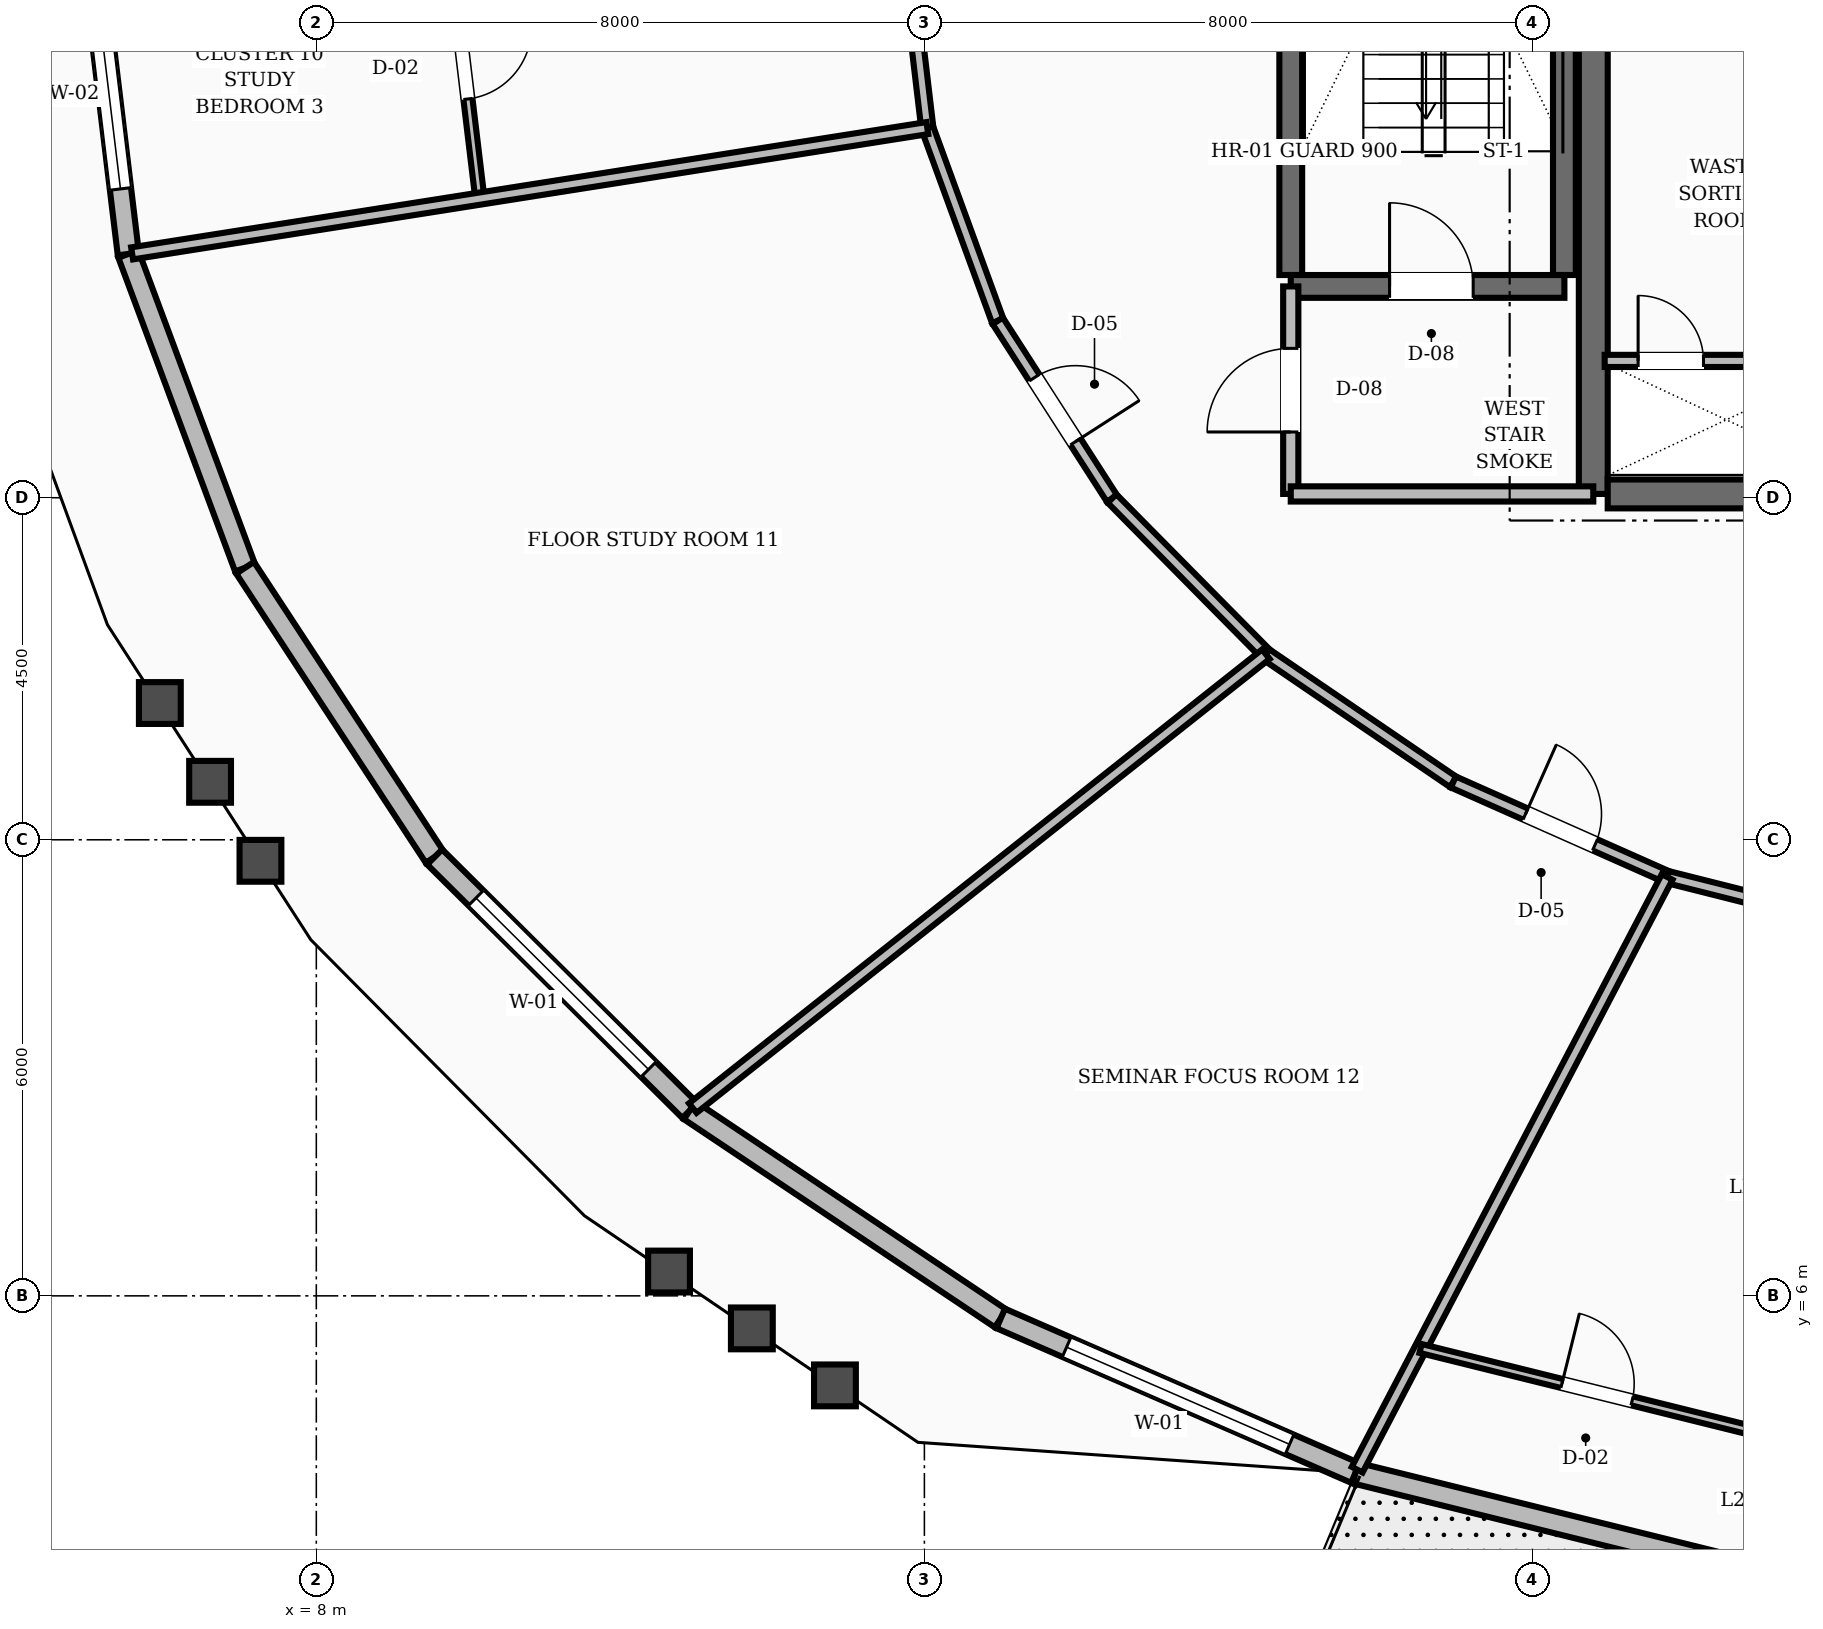
"""IFC4 building model, lengths in metres.
Left out: names, types, materials, properties, quantities, classifications, styles, units other than length and angle.
Written with IfcOpenShell. Run it as: python <this file> out.ifc"""

import sys

from ifc_helpers import new_model, si_unit, direction, frame, frame_2d, origin, place, context, subcontext, project, spatial, rectangle, extrude, element, fill, save


model = new_model("IFC4")
c1 = context("Model", 3, precision=1e-05, world=origin(), true_north=direction((0.0, 1.0)))
c2 = subcontext(c1, "Body", "Model", "MODEL_VIEW")
j1 = project(units=[si_unit("LENGTHUNIT", "METRE"), si_unit("PLANEANGLEUNIT", "RADIAN")], contexts=[c1])
p1 = place(None, origin())
s1 = spatial("IfcSite", under=j1, at=p1, CompositionType="ELEMENT")
p2 = place(p1, origin())
s2 = spatial("IfcBuilding", under=s1, at=p2, CompositionType="ELEMENT")
p3 = place(p2, frame((0.0, 0.0, 88.0)))
s3 = spatial("IfcBuildingStorey", under=s2, at=p3, CompositionType="ELEMENT", Elevation=88.0)
p4 = place(p3, frame((24.8, 16.55, 0.0), z_axis=(0.0, 0.0, 1.0), x_axis=(0.0, 1.0, 0.0)))
e1 = element("IfcWall", 1, at=p4, inside=s3, PredefinedType="SHEAR", context=c2, shape_type="SweptSolid", body=[
    extrude(rectangle(XDim=6.3, YDim=0.38, at=frame_2d((3.15, 0.0))), origin(), (0.0, 0.0, 1.0), 3.6),
])
p5 = place(p3, frame((24.99, 16.55, 0.0), z_axis=(0.0, 0.0, 1.0), x_axis=(1.0, 0.0, 0.0)))
e2 = element("IfcWall", 2, at=p5, inside=s3, PredefinedType="SHEAR", context=c2, shape_type="SweptSolid", body=[
    extrude(rectangle(XDim=3.21, YDim=0.38, at=frame_2d((1.605, 0.0))), origin(), (0.0, 0.0, 1.0), 3.6),
])
for number, where, z_axis, x_axis in (
    (3, (20.82, 19.43, 0.0), (0.0, 0.0, 1.0), (0.0, 1.0, 0.0)),
    (4, (24.42, 19.43, 0.0), (0.0, 0.0, 1.0), (0.0, 1.0, 0.0)),
):
    element("IfcWall", number, at=place(p3, frame(where, z_axis=z_axis, x_axis=x_axis)), inside=s3, PredefinedType="SHEAR", context=c2, shape_type="SweptSolid", body=[
        extrude(rectangle(XDim=8.74, YDim=0.3, at=frame_2d((4.37, 0.0))), origin(), (0.0, 0.0, 1.0), 3.6),
    ])
p6 = place(p3, frame((20.82, 19.28, 0.0), z_axis=(0.0, 0.0, 1.0), x_axis=(1.0, 0.0, 0.0)))
e5 = element("IfcWall", 5, at=p6, inside=s3, PredefinedType="SHEAR", context=c2, shape_type="SweptSolid", body=[
    extrude(rectangle(XDim=3.6, YDim=0.3, at=frame_2d((1.8, 0.0))), origin(), (0.0, 0.0, 1.0), 3.6),
])
p7 = place(p6, frame((1.3, 0.0, 0.0)))
e6 = element("IfcOpeningElement", 6, at=p7, cuts=e5, PredefinedType="OPENING", context=c2, shape_type="SweptSolid", body=[
    extrude(rectangle(XDim=1.1, YDim=2.1, at=frame_2d((0.55, 1.05))), frame((0.0, 0.16, 0.0), z_axis=(0.0, -1.0, 0.0), x_axis=(1.0, 0.0, 0.0)), (0.0, 0.0, 1.0), 0.32),
])
p8 = place(p3, frame((5.008, 24.0, 0.0), z_axis=(0.0, 0.0, 1.0), x_axis=(0.11991322244, -0.992784376934, 0.0)))
e7 = element("IfcWall", 7, at=p8, inside=s3, PredefinedType="STANDARD", context=c2, shape_type="SweptSolid", body=[
    extrude(rectangle(XDim=4.324, YDim=0.28, at=frame_2d((2.162, 0.0))), origin(), (0.0, 0.0, 1.0), 2.71),
])
p9 = place(p8, frame((0.862, 0.0, 0.8)))
e8 = element("IfcOpeningElement", 8, at=p9, cuts=e7, PredefinedType="OPENING", context=c2, shape_type="SweptSolid", body=[
    extrude(rectangle(XDim=2.6, YDim=1.65, at=frame_2d((1.3, 0.825))), frame((0.0, 0.15, 0.0), z_axis=(0.0, -1.0, 0.0), x_axis=(1.0, 0.0, 0.0)), (0.0, 0.0, 1.0), 0.3),
])
p10 = place(p3, frame((5.527, 19.707, 0.0), z_axis=(0.0, 0.0, 1.0), x_axis=(0.348747298865, -0.937216795376, 0.0)))
e9 = element("IfcWall", 9, at=p10, inside=s3, PredefinedType="STANDARD", context=c2, shape_type="SweptSolid", body=[
    extrude(rectangle(XDim=4.405, YDim=0.28, at=frame_2d((2.202, 0.0))), origin(), (0.0, 0.0, 1.0), 2.71),
])
p11 = place(p3, frame((7.063, 15.579, 0.0), z_axis=(0.0, 0.0, 1.0), x_axis=(0.548243756992, -0.836318589366, 0.0)))
e10 = element("IfcWall", 10, at=p11, inside=s3, PredefinedType="STANDARD", context=c2, shape_type="SweptSolid", body=[
    extrude(rectangle(XDim=4.549, YDim=0.28, at=frame_2d((2.275, 0.0))), origin(), (0.0, 0.0, 1.0), 2.71),
])
p12 = place(p3, frame((9.557, 11.774, 0.0), z_axis=(0.0, 0.0, 1.0), x_axis=(0.709450520297, -0.704755247763, 0.0)))
e11 = element("IfcWall", 11, at=p12, inside=s3, PredefinedType="STANDARD", context=c2, shape_type="SweptSolid", body=[
    extrude(rectangle(XDim=4.732, YDim=0.28, at=frame_2d((2.366, 0.0))), origin(), (0.0, 0.0, 1.0), 2.71),
])
p13 = place(p12, frame((0.766, 0.0, 0.8)))
e12 = element("IfcOpeningElement", 12, at=p13, cuts=e11, PredefinedType="OPENING", context=c2, shape_type="SweptSolid", body=[
    extrude(rectangle(XDim=3.2, YDim=1.65, at=frame_2d((1.6, 0.825))), frame((0.0, 0.15, 0.0), z_axis=(0.0, -1.0, 0.0), x_axis=(1.0, 0.0, 0.0)), (0.0, 0.0, 1.0), 0.3),
])
p14 = place(p3, frame((12.914, 8.439, 0.0), z_axis=(0.0, 0.0, 1.0), x_axis=(0.831102692713, -0.556118974829, 0.0)))
e13 = element("IfcWall", 13, at=p14, inside=s3, PredefinedType="STANDARD", context=c2, shape_type="SweptSolid", body=[
    extrude(rectangle(XDim=4.921, YDim=0.28, at=frame_2d((2.461, 0.0))), origin(), (0.0, 0.0, 1.0), 2.71),
])
p15 = place(p3, frame((17.004, 5.702, 0.0), z_axis=(0.0, 0.0, 1.0), x_axis=(0.916744158445, -0.399474840205, 0.0)))
e14 = element("IfcWall", 14, at=p15, inside=s3, PredefinedType="STANDARD", context=c2, shape_type="SweptSolid", body=[
    extrude(rectangle(XDim=5.09, YDim=0.28, at=frame_2d((2.545, 0.0))), origin(), (0.0, 0.0, 1.0), 2.71),
])
p16 = place(p15, frame((0.945, 0.0, 0.8)))
e15 = element("IfcOpeningElement", 15, at=p16, cuts=e14, PredefinedType="OPENING", context=c2, shape_type="SweptSolid", body=[
    extrude(rectangle(XDim=3.2, YDim=1.65, at=frame_2d((1.6, 0.825))), frame((0.0, 0.15, 0.0), z_axis=(0.0, -1.0, 0.0), x_axis=(1.0, 0.0, 0.0)), (0.0, 0.0, 1.0), 0.3),
])
p17 = place(p3, frame((21.671, 3.669, 0.0), z_axis=(0.0, 0.0, 1.0), x_axis=(0.970745192344, -0.240111997913, 0.0)))
e16 = element("IfcWall", 16, at=p17, inside=s3, PredefinedType="STANDARD", context=c2, shape_type="SweptSolid", body=[
    extrude(rectangle(XDim=5.216, YDim=0.28, at=frame_2d((2.608, 0.0))), origin(), (0.0, 0.0, 1.0), 2.71),
])
p18 = place(p3, frame((20.82, 16.55, 0.0), z_axis=(0.0, 0.0, 1.0), x_axis=(0.0, 1.0, 0.0)))
e17 = element("IfcWall", 17, at=p18, inside=s3, PredefinedType="SOLIDWALL", context=c2, shape_type="SweptSolid", body=[
    extrude(rectangle(XDim=2.73, YDim=0.2, at=frame_2d((1.365, 0.0))), origin(), (0.0, 0.0, 1.0), 2.71),
])
p19 = place(p18, frame((0.815, 0.0, 0.0)))
e18 = element("IfcOpeningElement", 18, at=p19, cuts=e17, PredefinedType="OPENING", context=c2, shape_type="SweptSolid", body=[
    extrude(rectangle(XDim=1.1, YDim=2.1, at=frame_2d((0.55, 1.05))), frame((0.0, 0.11, 0.0), z_axis=(0.0, -1.0, 0.0), x_axis=(1.0, 0.0, 0.0)), (0.0, 0.0, 1.0), 0.22),
])
p20 = place(p3, frame((20.82, 16.55, 0.0), z_axis=(0.0, 0.0, 1.0), x_axis=(1.0, 0.0, 0.0)))
e19 = element("IfcWall", 19, at=p20, inside=s3, PredefinedType="SOLIDWALL", context=c2, shape_type="SweptSolid", body=[
    extrude(rectangle(XDim=3.98, YDim=0.2, at=frame_2d((1.99, 0.0))), origin(), (0.0, 0.0, 1.0), 2.71),
])
p21 = place(p3, frame((24.95, 18.3, 0.0), z_axis=(0.0, 0.0, 1.0), x_axis=(1.0, 0.0, 0.0)))
e20 = element("IfcWall", 20, at=p21, inside=s3, PredefinedType="SOLIDWALL", context=c2, shape_type="SweptSolid", body=[
    extrude(rectangle(XDim=3.2, YDim=0.16, at=frame_2d((1.6, 0.0))), origin(), (0.0, 0.0, 1.0), 2.71),
])
p22 = place(p21, frame((0.44, 0.0, 0.0)))
e21 = element("IfcOpeningElement", 21, at=p22, cuts=e20, PredefinedType="OPENING", context=c2, shape_type="SweptSolid", body=[
    extrude(rectangle(XDim=0.86, YDim=2.05, at=frame_2d((0.43, 1.025))), frame((0.0, 0.09, 0.0), z_axis=(0.0, -1.0, 0.0), x_axis=(1.0, 0.0, 0.0)), (0.0, 0.0, 1.0), 0.18),
])
p23 = place(p3, frame((15.726, 24.0, 0.0), z_axis=(0.0, 0.0, 1.0), x_axis=(0.117763961213, -0.99304161516, 0.0)))
e22 = element("IfcWall", 22, at=p23, inside=s3, PredefinedType="SOLIDWALL", context=c2, shape_type="SweptSolid", body=[
    extrude(rectangle(XDim=2.656, YDim=0.16, at=frame_2d((1.328, 0.0))), origin(), (0.0, 0.0, 1.0), 2.71),
])
p24 = place(p3, frame((16.039, 21.363, 0.0), z_axis=(0.0, 0.0, 1.0), x_axis=(0.343013437329, -0.939330496583, 0.0)))
e23 = element("IfcWall", 23, at=p24, inside=s3, PredefinedType="SOLIDWALL", context=c2, shape_type="SweptSolid", body=[
    extrude(rectangle(XDim=2.7, YDim=0.16, at=frame_2d((1.35, 0.0))), origin(), (0.0, 0.0, 1.0), 2.71),
])
p25 = place(p3, frame((16.965, 18.827, 0.0), z_axis=(0.0, 0.0, 1.0), x_axis=(0.541126045017, -0.840941498206, 0.0)))
e24 = element("IfcWall", 24, at=p25, inside=s3, PredefinedType="SOLIDWALL", context=c2, shape_type="SweptSolid", body=[
    extrude(rectangle(XDim=2.779, YDim=0.16, at=frame_2d((1.39, 0.0))), origin(), (0.0, 0.0, 1.0), 2.71),
])
p26 = place(p25, frame((0.89, 0.0, 0.0)))
e25 = element("IfcOpeningElement", 25, at=p26, cuts=e24, PredefinedType="OPENING", context=c2, shape_type="SweptSolid", body=[
    extrude(rectangle(XDim=1.0, YDim=2.1, at=frame_2d((0.5, 1.05))), frame((0.0, 0.09, 0.0), z_axis=(0.0, -1.0, 0.0), x_axis=(1.0, 0.0, 0.0)), (0.0, 0.0, 1.0), 0.18),
])
p27 = place(p3, frame((18.469, 16.49, 0.0), z_axis=(0.0, 0.0, 1.0), x_axis=(0.702811997, -0.711375636969, 0.0)))
e26 = element("IfcWall", 26, at=p27, inside=s3, PredefinedType="SOLIDWALL", context=c2, shape_type="SweptSolid", body=[
    extrude(rectangle(XDim=2.879, YDim=0.16, at=frame_2d((1.44, 0.0))), origin(), (0.0, 0.0, 1.0), 2.71),
])
p28 = place(p3, frame((20.492, 14.441, 0.0), z_axis=(0.0, 0.0, 1.0), x_axis=(0.826293096206, -0.56324037423, 0.0)))
e27 = element("IfcWall", 27, at=p28, inside=s3, PredefinedType="SOLIDWALL", context=c2, shape_type="SweptSolid", body=[
    extrude(rectangle(XDim=2.985, YDim=0.16, at=frame_2d((1.492, 0.0))), origin(), (0.0, 0.0, 1.0), 2.71),
])
p29 = place(p3, frame((22.959, 12.76, 0.0), z_axis=(0.0, 0.0, 1.0), x_axis=(0.913952123493, -0.405822024984, 0.0)))
e28 = element("IfcWall", 28, at=p29, inside=s3, PredefinedType="SOLIDWALL", context=c2, shape_type="SweptSolid", body=[
    extrude(rectangle(XDim=3.078, YDim=0.16, at=frame_2d((1.539, 0.0))), origin(), (0.0, 0.0, 1.0), 2.71),
])
p30 = place(p29, frame((1.039, 0.0, 0.0)))
e29 = element("IfcOpeningElement", 29, at=p30, cuts=e28, PredefinedType="OPENING", context=c2, shape_type="SweptSolid", body=[
    extrude(rectangle(XDim=1.0, YDim=2.1, at=frame_2d((0.5, 1.05))), frame((0.0, 0.09, 0.0), z_axis=(0.0, -1.0, 0.0), x_axis=(1.0, 0.0, 0.0)), (0.0, 0.0, 1.0), 0.18),
])
p31 = place(p3, frame((25.772, 11.511, 0.0), z_axis=(0.0, 0.0, 1.0), x_axis=(0.969689238064, -0.244341526521, 0.0)))
e30 = element("IfcWall", 30, at=p31, inside=s3, PredefinedType="SOLIDWALL", context=c2, shape_type="SweptSolid", body=[
    extrude(rectangle(XDim=3.148, YDim=0.16, at=frame_2d((1.574, 0.0))), origin(), (0.0, 0.0, 1.0), 2.71),
])
p32 = place(p3, frame((9.724, 24.0, 0.0), z_axis=(0.0, 0.0, 1.0), x_axis=(0.119204211049, -0.992869757858, 0.0)))
e31 = element("IfcWall", 31, at=p32, inside=s3, PredefinedType="PARTITIONING", context=c2, shape_type="SweptSolid", body=[
    extrude(rectangle(XDim=3.59, YDim=0.12, at=frame_2d((1.795, 0.0))), origin(), (0.0, 0.0, 1.0), 2.71),
])
p33 = place(p32, frame((1.32, 0.0, 0.0)))
e32 = element("IfcOpeningElement", 32, at=p33, cuts=e31, PredefinedType="OPENING", context=c2, shape_type="SweptSolid", body=[
    extrude(rectangle(XDim=0.95, YDim=2.1, at=frame_2d((0.475, 1.05))), frame((0.0, 0.07, 0.0), z_axis=(0.0, -1.0, 0.0), x_axis=(1.0, 0.0, 0.0)), (0.0, 0.0, 1.0), 0.14),
])
p34 = place(p3, frame((16.039, 21.363, 0.0), z_axis=(0.0, 0.0, 1.0), x_axis=(-0.987817665594, -0.155615743231, 0.0)))
e33 = element("IfcWall", 33, at=p34, inside=s3, PredefinedType="SOLIDWALL", context=c2, shape_type="SweptSolid", body=[
    extrude(rectangle(XDim=10.592, YDim=0.16, at=frame_2d((5.296, 0.0))), origin(), (0.0, 0.0, 1.0), 2.71),
])
p35 = place(p3, frame((20.492, 14.441, 0.0), z_axis=(0.0, 0.0, 1.0), x_axis=(-0.783915576776, -0.620867432298, 0.0)))
e34 = element("IfcWall", 34, at=p35, inside=s3, PredefinedType="SOLIDWALL", context=c2, shape_type="SweptSolid", body=[
    extrude(rectangle(XDim=9.617, YDim=0.16, at=frame_2d((4.809, 0.0))), origin(), (0.0, 0.0, 1.0), 2.71),
])
p36 = place(p3, frame((25.772, 11.511, 0.0), z_axis=(0.0, 0.0, 1.0), x_axis=(-0.463452284004, -0.886121876748, 0.0)))
e35 = element("IfcWall", 35, at=p36, inside=s3, PredefinedType="SOLIDWALL", context=c2, shape_type="SweptSolid", body=[
    extrude(rectangle(XDim=8.8, YDim=0.16, at=frame_2d((4.4, 0.0))), origin(), (0.0, 0.0, 1.0), 2.71),
])
p37 = place(p3, frame((22.528, 5.308, 0.0), z_axis=(0.0, 0.0, 1.0), x_axis=(0.970606020149, -0.240673957149, 0.0)))
e36 = element("IfcWall", 36, at=p37, inside=s3, PredefinedType="PARTITIONING", context=c2, shape_type="SweptSolid", body=[
    extrude(rectangle(XDim=4.784, YDim=0.12, at=frame_2d((2.392, 0.0))), origin(), (0.0, 0.0, 1.0), 2.71),
])
p38 = place(p37, frame((1.917, 0.0, 0.0)))
e37 = element("IfcOpeningElement", 37, at=p38, cuts=e36, PredefinedType="OPENING", context=c2, shape_type="SweptSolid", body=[
    extrude(rectangle(XDim=0.95, YDim=2.1, at=frame_2d((0.475, 1.05))), frame((0.0, 0.07, 0.0), z_axis=(0.0, -1.0, 0.0), x_axis=(1.0, 0.0, 0.0)), (0.0, 0.0, 1.0), 0.14),
])
p39 = place(p9, origin())
e38 = element("IfcWindow", 38, at=p39, inside=s3, PartitioningType="SINGLE_PANEL", PredefinedType="WINDOW", context=c2, shape_type="SweptSolid", body=[
    extrude(rectangle(XDim=2.6, YDim=1.65, at=frame_2d((1.3, 0.825))), frame((0.0, 0.03, 0.0), z_axis=(0.0, -1.0, 0.0), x_axis=(1.0, 0.0, 0.0)), (0.0, 0.0, 1.0), 0.06),
])
fill(e8, e38)
p40 = place(p13, origin())
e39 = element("IfcWindow", 39, at=p40, inside=s3, PartitioningType="SINGLE_PANEL", PredefinedType="WINDOW", context=c2, shape_type="SweptSolid", body=[
    extrude(rectangle(XDim=3.2, YDim=1.65, at=frame_2d((1.6, 0.825))), frame((0.0, 0.03, 0.0), z_axis=(0.0, -1.0, 0.0), x_axis=(1.0, 0.0, 0.0)), (0.0, 0.0, 1.0), 0.06),
])
fill(e12, e39)
p41 = place(p16, origin())
e40 = element("IfcWindow", 40, at=p41, inside=s3, PartitioningType="SINGLE_PANEL", PredefinedType="WINDOW", context=c2, shape_type="SweptSolid", body=[
    extrude(rectangle(XDim=3.2, YDim=1.65, at=frame_2d((1.6, 0.825))), frame((0.0, 0.03, 0.0), z_axis=(0.0, -1.0, 0.0), x_axis=(1.0, 0.0, 0.0)), (0.0, 0.0, 1.0), 0.06),
])
fill(e15, e40)
p42 = place(p7, origin())
e41 = element("IfcDoor", 41, at=p42, inside=s3, OperationType="SINGLE_SWING_LEFT", PredefinedType="DOOR", context=c2, shape_type="SweptSolid", body=[
    extrude(rectangle(XDim=1.1, YDim=2.1, at=frame_2d((0.55, 1.05))), frame((0.0, 0.025, 0.0), z_axis=(0.0, -1.0, 0.0), x_axis=(1.0, 0.0, 0.0)), (0.0, 0.0, 1.0), 0.05),
])
fill(e6, e41)
p43 = place(p19, origin())
e42 = element("IfcDoor", 42, at=p43, inside=s3, OperationType="SINGLE_SWING_LEFT", PredefinedType="DOOR", context=c2, shape_type="SweptSolid", body=[
    extrude(rectangle(XDim=1.1, YDim=2.1, at=frame_2d((0.55, 1.05))), frame((0.0, 0.025, 0.0), z_axis=(0.0, -1.0, 0.0), x_axis=(1.0, 0.0, 0.0)), (0.0, 0.0, 1.0), 0.05),
])
fill(e18, e42)
p44 = place(p22, origin())
e43 = element("IfcDoor", 43, at=p44, inside=s3, OperationType="SINGLE_SWING_LEFT", PredefinedType="TRAPDOOR", context=c2, shape_type="SweptSolid", body=[
    extrude(rectangle(XDim=0.86, YDim=2.05, at=frame_2d((0.43, 1.025))), frame((0.0, 0.025, 0.0), z_axis=(0.0, -1.0, 0.0), x_axis=(1.0, 0.0, 0.0)), (0.0, 0.0, 1.0), 0.05),
])
fill(e21, e43)
p45 = place(p33, origin())
e44 = element("IfcDoor", 44, at=p45, inside=s3, OperationType="SINGLE_SWING_LEFT", PredefinedType="DOOR", context=c2, shape_type="SweptSolid", body=[
    extrude(rectangle(XDim=0.95, YDim=2.1, at=frame_2d((0.475, 1.05))), frame((0.0, 0.025, 0.0), z_axis=(0.0, -1.0, 0.0), x_axis=(1.0, 0.0, 0.0)), (0.0, 0.0, 1.0), 0.05),
])
fill(e32, e44)
p46 = place(p26, origin())
e45 = element("IfcDoor", 45, at=p46, inside=s3, OperationType="SINGLE_SWING_RIGHT", PredefinedType="DOOR", context=c2, shape_type="SweptSolid", body=[
    extrude(rectangle(XDim=1.0, YDim=2.1, at=frame_2d((0.5, 1.05))), frame((0.0, 0.025, 0.0), z_axis=(0.0, -1.0, 0.0), x_axis=(1.0, 0.0, 0.0)), (0.0, 0.0, 1.0), 0.05),
])
fill(e25, e45)
p47 = place(p30, origin())
e46 = element("IfcDoor", 46, at=p47, inside=s3, OperationType="SINGLE_SWING_LEFT", PredefinedType="DOOR", context=c2, shape_type="SweptSolid", body=[
    extrude(rectangle(XDim=1.0, YDim=2.1, at=frame_2d((0.5, 1.05))), frame((0.0, 0.025, 0.0), z_axis=(0.0, -1.0, 0.0), x_axis=(1.0, 0.0, 0.0)), (0.0, 0.0, 1.0), 0.05),
])
fill(e29, e46)
p48 = place(p38, origin())
e47 = element("IfcDoor", 47, at=p48, inside=s3, OperationType="SINGLE_SWING_LEFT", PredefinedType="DOOR", context=c2, shape_type="SweptSolid", body=[
    extrude(rectangle(XDim=0.95, YDim=2.1, at=frame_2d((0.475, 1.05))), frame((0.0, 0.025, 0.0), z_axis=(0.0, -1.0, 0.0), x_axis=(1.0, 0.0, 0.0)), (0.0, 0.0, 1.0), 0.05),
])
fill(e37, e47)
save(model, sys.argv[1])
